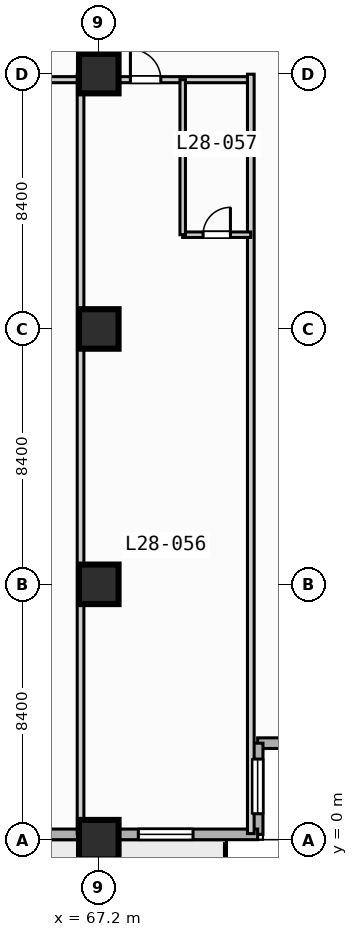
"""IFC4 building model, lengths in metres.
Left out: names, types, materials, properties, quantities, classifications, styles, units other than length and angle.
Written with IfcOpenShell. Run it as: python <this file> out.ifc"""

import sys

from ifc_helpers import new_model, si_unit, direction, frame, frame_2d, origin, origin_2d, place, context, subcontext, project, spatial, rectangle, extrude, element, fill, save


model = new_model("IFC4")
c1 = context("Model", 3, precision=1e-05, world=origin(), true_north=direction((0.0, 1.0)))
c2 = subcontext(c1, "Body", "Model", "MODEL_VIEW")
j1 = project(units=[si_unit("LENGTHUNIT", "METRE"), si_unit("PLANEANGLEUNIT", "RADIAN")], contexts=[c1])
p1 = place(None, origin())
s1 = spatial("IfcSite", under=j1, at=p1, CompositionType="ELEMENT")
p2 = place(p1, origin())
s2 = spatial("IfcBuilding", under=s1, at=p2, CompositionType="ELEMENT")
p3 = place(p2, frame((0.0, 0.0, 119.0)))
s3 = spatial("IfcBuildingStorey", under=s2, at=p3, CompositionType="ELEMENT", Elevation=119.0)
for number, where, z_axis, x_axis in (
    (1, (67.2, 0.0, 0.0), (0.0, 0.0, 1.0), (1.0, 0.0, 0.0)),
    (2, (67.2, 8.4, 0.0), (0.0, 0.0, 1.0), (1.0, 0.0, 0.0)),
    (3, (67.2, 16.8, 0.0), (0.0, 0.0, 1.0), (1.0, 0.0, 0.0)),
    (4, (67.2, 25.2, 0.0), (0.0, 0.0, 1.0), (1.0, 0.0, 0.0)),
):
    element("IfcColumn", number, at=place(p3, frame(where, z_axis=z_axis, x_axis=x_axis)), inside=s3, PredefinedType="COLUMN", context=c2, shape_type="SweptSolid", body=[
        extrude(rectangle(XDim=1.3, YDim=1.3, at=origin_2d()), origin(), (0.0, 0.0, 1.0), 3.8),
    ])
p4 = place(p3, frame((75.425, 3.175, 0.0), z_axis=(0.0, 0.0, 1.0), x_axis=(-1.0, 0.0, 0.0)))
e5 = element("IfcWall", 5, at=p4, inside=s3, PredefinedType="STANDARD", context=c2, shape_type="SweptSolid", body=[
    extrude(rectangle(XDim=3.0, YDim=0.35, at=frame_2d((1.5, 0.0))), origin(), (0.0, 0.0, 1.0), 3.55),
])
p5 = place(p3, frame((72.425, 3.175, 0.0), z_axis=(0.0, 0.0, 1.0), x_axis=(0.0, -1.0, 0.0)))
e6 = element("IfcWall", 6, at=p5, inside=s3, PredefinedType="STANDARD", context=c2, shape_type="SweptSolid", body=[
    extrude(rectangle(XDim=3.0, YDim=0.35, at=frame_2d((1.5, 0.0))), origin(), (0.0, 0.0, 1.0), 3.55),
])
p6 = place(p5, frame((0.522, 0.0, 0.85)))
e7 = element("IfcOpeningElement", 7, at=p6, cuts=e6, PredefinedType="OPENING", context=c2, shape_type="SweptSolid", body=[
    extrude(rectangle(XDim=1.8, YDim=1.8, at=frame_2d((0.9, 0.9))), frame((0.0, 0.185, 0.0), z_axis=(0.0, -1.0, 0.0), x_axis=(1.0, 0.0, 0.0)), (0.0, 0.0, 1.0), 0.37),
])
p7 = place(p3, frame((72.425, 0.175, 0.0), z_axis=(0.0, 0.0, 1.0), x_axis=(-1.0, 0.0, 0.0)))
e8 = element("IfcWall", 8, at=p7, inside=s3, PredefinedType="STANDARD", context=c2, shape_type="SweptSolid", body=[
    extrude(rectangle(XDim=69.25, YDim=0.35, at=frame_2d((34.625, 0.0))), origin(), (0.0, 0.0, 1.0), 3.55),
])
p8 = place(p7, frame((50.725, 0.0, 0.0)))
e9 = element("IfcOpeningElement", 9, at=p8, cuts=e8, PredefinedType="OPENING", context=c2, shape_type="SweptSolid", body=[
    extrude(rectangle(XDim=1.4, YDim=2.2, at=frame_2d((0.7, 1.1))), frame((0.0, 0.185, 0.0), z_axis=(0.0, -1.0, 0.0), x_axis=(1.0, 0.0, 0.0)), (0.0, 0.0, 1.0), 0.37),
])
p9 = place(p7, frame((58.725, 0.0, 0.85)))
e10 = element("IfcOpeningElement", 10, at=p9, cuts=e8, PredefinedType="OPENING", context=c2, shape_type="SweptSolid", body=[
    extrude(rectangle(XDim=2.2, YDim=1.8, at=frame_2d((1.1, 0.9))), frame((0.0, 0.185, 0.0), z_axis=(0.0, -1.0, 0.0), x_axis=(1.0, 0.0, 0.0)), (0.0, 0.0, 1.0), 0.37),
])
p10 = place(p7, frame((41.925, 0.0, 0.85)))
e11 = element("IfcOpeningElement", 11, at=p10, cuts=e8, PredefinedType="OPENING", context=c2, shape_type="SweptSolid", body=[
    extrude(rectangle(XDim=2.2, YDim=1.8, at=frame_2d((1.1, 0.9))), frame((0.0, 0.185, 0.0), z_axis=(0.0, -1.0, 0.0), x_axis=(1.0, 0.0, 0.0)), (0.0, 0.0, 1.0), 0.37),
])
p11 = place(p7, frame((33.525, 0.0, 0.85)))
e12 = element("IfcOpeningElement", 12, at=p11, cuts=e8, PredefinedType="OPENING", context=c2, shape_type="SweptSolid", body=[
    extrude(rectangle(XDim=2.2, YDim=1.8, at=frame_2d((1.1, 0.9))), frame((0.0, 0.185, 0.0), z_axis=(0.0, -1.0, 0.0), x_axis=(1.0, 0.0, 0.0)), (0.0, 0.0, 1.0), 0.37),
])
p12 = place(p7, frame((25.125, 0.0, 0.85)))
e13 = element("IfcOpeningElement", 13, at=p12, cuts=e8, PredefinedType="OPENING", context=c2, shape_type="SweptSolid", body=[
    extrude(rectangle(XDim=2.2, YDim=1.8, at=frame_2d((1.1, 0.9))), frame((0.0, 0.185, 0.0), z_axis=(0.0, -1.0, 0.0), x_axis=(1.0, 0.0, 0.0)), (0.0, 0.0, 1.0), 0.37),
])
p13 = place(p7, frame((8.325, 0.0, 0.85)))
e14 = element("IfcOpeningElement", 14, at=p13, cuts=e8, PredefinedType="OPENING", context=c2, shape_type="SweptSolid", body=[
    extrude(rectangle(XDim=2.2, YDim=1.8, at=frame_2d((1.1, 0.9))), frame((0.0, 0.185, 0.0), z_axis=(0.0, -1.0, 0.0), x_axis=(1.0, 0.0, 0.0)), (0.0, 0.0, 1.0), 0.37),
])
p14 = place(p7, frame((2.125, 0.0, 0.85)))
e15 = element("IfcOpeningElement", 15, at=p14, cuts=e8, PredefinedType="OPENING", context=c2, shape_type="SweptSolid", body=[
    extrude(rectangle(XDim=1.8, YDim=1.8, at=frame_2d((0.9, 0.9))), frame((0.0, 0.185, 0.0), z_axis=(0.0, -1.0, 0.0), x_axis=(1.0, 0.0, 0.0)), (0.0, 0.0, 1.0), 0.37),
])
p15 = place(p3, frame((61.4, 25.0, 0.0), z_axis=(0.0, 0.0, 1.0), x_axis=(1.0, 0.0, 0.0)))
e16 = element("IfcWall", 16, at=p15, inside=s3, PredefinedType="PARTITIONING", context=c2, shape_type="SweptSolid", body=[
    extrude(rectangle(XDim=10.8, YDim=0.2, at=frame_2d((5.4, 0.0))), origin(), (0.0, 0.0, 1.0), 2.8),
])
p16 = place(p15, frame((3.18, 0.0, 0.0)))
e17 = element("IfcOpeningElement", 17, at=p16, cuts=e16, PredefinedType="OPENING", context=c2, shape_type="SweptSolid", body=[
    extrude(rectangle(XDim=1.0, YDim=2.15, at=frame_2d((0.5, 1.075))), frame((0.0, 0.11, 0.0), z_axis=(0.0, -1.0, 0.0), x_axis=(1.0, 0.0, 0.0)), (0.0, 0.0, 1.0), 0.22),
])
p17 = place(p15, frame((6.84, 0.0, 0.0)))
e18 = element("IfcOpeningElement", 18, at=p17, cuts=e16, PredefinedType="OPENING", context=c2, shape_type="SweptSolid", body=[
    extrude(rectangle(XDim=1.0, YDim=2.15, at=frame_2d((0.5, 1.075))), frame((0.0, 0.11, 0.0), z_axis=(0.0, -1.0, 0.0), x_axis=(1.0, 0.0, 0.0)), (0.0, 0.0, 1.0), 0.22),
])
for number, where, z_axis, x_axis in (
    (19, (66.6, 0.2, 0.0), (0.0, 0.0, 1.0), (0.0, 1.0, 0.0)),
    (20, (72.2, 0.2, 0.0), (0.0, 0.0, 1.0), (0.0, 1.0, 0.0)),
):
    element("IfcWall", number, at=place(p3, frame(where, z_axis=z_axis, x_axis=x_axis)), inside=s3, PredefinedType="PARTITIONING", context=c2, shape_type="SweptSolid", body=[
        extrude(rectangle(XDim=24.98, YDim=0.22, at=frame_2d((12.49, 0.0))), origin(), (0.0, 0.0, 1.0), 3.55),
    ])
p18 = place(p3, frame((69.96, 19.9, 0.0), z_axis=(0.0, 0.0, 1.0), x_axis=(1.0, 0.0, 0.0)))
e21 = element("IfcWall", 21, at=p18, inside=s3, PredefinedType="PLUMBINGWALL", context=c2, shape_type="SweptSolid", body=[
    extrude(rectangle(XDim=2.24, YDim=0.18, at=frame_2d((1.12, 0.0))), origin(), (0.0, 0.0, 1.0), 3.55),
])
p19 = place(p18, frame((0.67, 0.0, 0.0)))
e22 = element("IfcOpeningElement", 22, at=p19, cuts=e21, PredefinedType="OPENING", context=c2, shape_type="SweptSolid", body=[
    extrude(rectangle(XDim=0.9, YDim=2.1, at=frame_2d((0.45, 1.05))), frame((0.0, 0.1, 0.0), z_axis=(0.0, -1.0, 0.0), x_axis=(1.0, 0.0, 0.0)), (0.0, 0.0, 1.0), 0.2),
])
p20 = place(p3, frame((69.96, 19.9, 0.0), z_axis=(0.0, 0.0, 1.0), x_axis=(0.0, 1.0, 0.0)))
e23 = element("IfcWall", 23, at=p20, inside=s3, PredefinedType="PLUMBINGWALL", context=c2, shape_type="SweptSolid", body=[
    extrude(rectangle(XDim=5.1, YDim=0.18, at=frame_2d((2.55, 0.0))), origin(), (0.0, 0.0, 1.0), 3.55),
])
p21 = place(p6, origin())
e24 = element("IfcWindow", 24, at=p21, inside=s3, PartitioningType="SINGLE_PANEL", PredefinedType="WINDOW", context=c2, shape_type="SweptSolid", body=[
    extrude(rectangle(XDim=1.8, YDim=1.8, at=frame_2d((0.9, 0.9))), frame((0.0, 0.03, 0.0), z_axis=(0.0, -1.0, 0.0), x_axis=(1.0, 0.0, 0.0)), (0.0, 0.0, 1.0), 0.06),
])
fill(e7, e24)
p22 = place(p14, origin())
e25 = element("IfcWindow", 25, at=p22, inside=s3, PartitioningType="SINGLE_PANEL", PredefinedType="WINDOW", context=c2, shape_type="SweptSolid", body=[
    extrude(rectangle(XDim=1.8, YDim=1.8, at=frame_2d((0.9, 0.9))), frame((0.0, 0.03, 0.0), z_axis=(0.0, -1.0, 0.0), x_axis=(1.0, 0.0, 0.0)), (0.0, 0.0, 1.0), 0.06),
])
fill(e15, e25)
p23 = place(p17, origin())
e26 = element("IfcDoor", 26, at=p23, inside=s3, OperationType="SINGLE_SWING_LEFT", PredefinedType="DOOR", context=c2, shape_type="SweptSolid", body=[
    extrude(rectangle(XDim=1.0, YDim=2.15, at=frame_2d((0.5, 1.075))), frame((0.0, 0.025, 0.0), z_axis=(0.0, -1.0, 0.0), x_axis=(1.0, 0.0, 0.0)), (0.0, 0.0, 1.0), 0.05),
])
fill(e18, e26)
p24 = place(p19, origin())
e27 = element("IfcDoor", 27, at=p24, inside=s3, OperationType="SINGLE_SWING_RIGHT", PredefinedType="DOOR", context=c2, shape_type="SweptSolid", body=[
    extrude(rectangle(XDim=0.9, YDim=2.1, at=frame_2d((0.45, 1.05))), frame((0.0, 0.025, 0.0), z_axis=(0.0, -1.0, 0.0), x_axis=(1.0, 0.0, 0.0)), (0.0, 0.0, 1.0), 0.05),
])
fill(e22, e27)
save(model, sys.argv[1])
